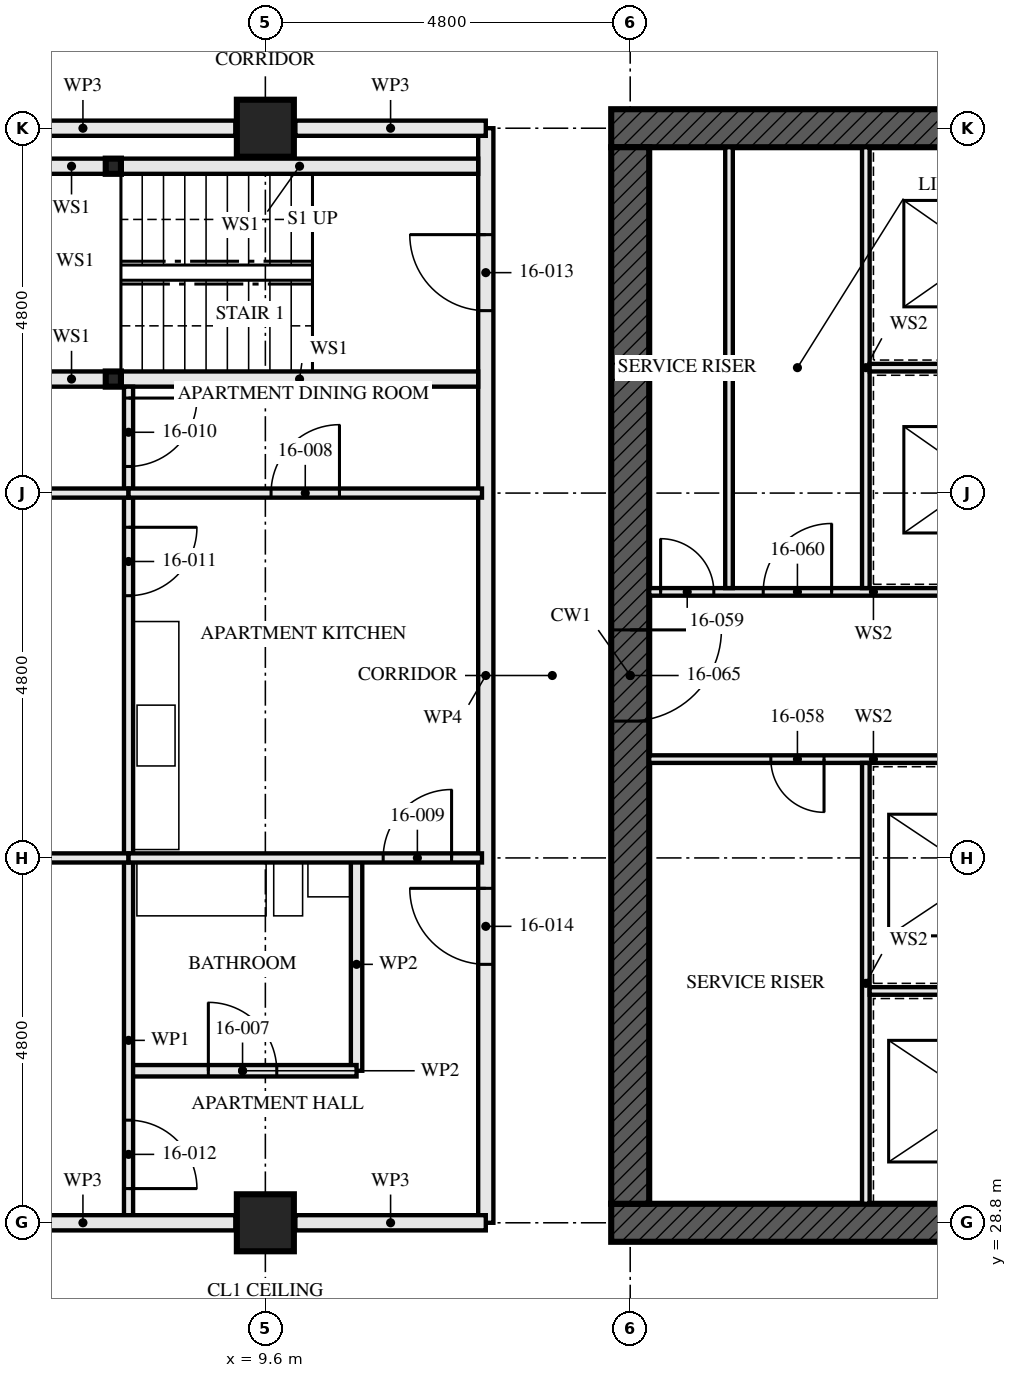
"""IFC4 building model, lengths in metres.
Left out: names, types, materials, properties, quantities, classifications, styles, units other than length and angle.
Written with IfcOpenShell. Run it as: python <this file> out.ifc"""

import sys

from ifc_helpers import new_model, si_unit, direction, frame, frame_2d, origin, origin_2d, place, context, subcontext, project, spatial, rectangle, hollow_rectangle, extrude, element, fill, save


model = new_model("IFC4")
c1 = context("Model", 3, precision=1e-05, world=origin(), true_north=direction((0.0, 1.0)))
c2 = subcontext(c1, "Body", "Model", "MODEL_VIEW")
j1 = project(units=[si_unit("LENGTHUNIT", "METRE"), si_unit("PLANEANGLEUNIT", "RADIAN")], contexts=[c1])
p1 = place(None, origin())
s1 = spatial("IfcSite", under=j1, at=p1, CompositionType="ELEMENT")
p2 = place(p1, origin())
s2 = spatial("IfcBuilding", under=s1, at=p2, CompositionType="ELEMENT")
p3 = place(p2, frame((0.0, 0.0, 62.0)))
s3 = spatial("IfcBuildingStorey", under=s2, at=p3, CompositionType="ELEMENT", Elevation=62.0)
for number, where, z_axis, x_axis in (
    (1, (9.6, 28.8, 0.0), (0.0, 0.0, 1.0), (0.0, 1.0, 0.0)),
    (2, (9.6, 43.2, 0.0), (0.0, 0.0, 1.0), (0.0, 1.0, 0.0)),
):
    element("IfcColumn", number, at=place(p3, frame(where, z_axis=z_axis, x_axis=x_axis)), inside=s3, PredefinedType="COLUMN", context=c2, shape_type="SweptSolid", body=[
        extrude(hollow_rectangle(XDim=0.75, YDim=0.75, WallThickness=0.08, at=origin_2d()), origin(), (0.0, 0.0, 1.0), 3.5),
    ])
p4 = place(p3, frame((14.15, 28.8, -0.17), z_axis=(0.0, 0.0, 1.0), x_axis=(1.0, 0.0, 0.0)))
e3 = element("IfcWall", 3, at=p4, inside=s3, PredefinedType="SHEAR", context=c2, shape_type="SweptSolid", body=[
    extrude(rectangle(XDim=14.9, YDim=0.5, at=frame_2d((7.45, 0.0))), origin(), (0.0, 0.0, 1.0), 3.5),
])
p5 = place(p4, frame((6.85, 0.0, 0.17)))
e4 = element("IfcOpeningElement", 4, at=p5, cuts=e3, PredefinedType="OPENING", context=c2, shape_type="SweptSolid", body=[
    extrude(rectangle(XDim=1.2, YDim=2.1, at=frame_2d((0.6, 1.05))), frame((0.0, 0.26, 0.0), z_axis=(0.0, -1.0, 0.0), x_axis=(1.0, 0.0, 0.0)), (0.0, 0.0, 1.0), 0.521),
])
p6 = place(p3, frame((29.05, 43.2, -0.17), z_axis=(0.0, 0.0, 1.0), x_axis=(-1.0, 0.0, 0.0)))
e5 = element("IfcWall", 5, at=p6, inside=s3, PredefinedType="SHEAR", context=c2, shape_type="SweptSolid", body=[
    extrude(rectangle(XDim=14.9, YDim=0.5, at=frame_2d((7.45, 0.0))), origin(), (0.0, 0.0, 1.0), 3.5),
])
p7 = place(p6, frame((6.85, 0.0, 0.17)))
e6 = element("IfcOpeningElement", 6, at=p7, cuts=e5, PredefinedType="OPENING", context=c2, shape_type="SweptSolid", body=[
    extrude(rectangle(XDim=1.2, YDim=2.1, at=frame_2d((0.6, 1.05))), frame((0.0, 0.26, 0.0), z_axis=(0.0, -1.0, 0.0), x_axis=(1.0, 0.0, 0.0)), (0.0, 0.0, 1.0), 0.521),
])
p8 = place(p3, frame((14.4, 42.95, -0.17), z_axis=(0.0, 0.0, 1.0), x_axis=(0.0, -1.0, 0.0)))
e7 = element("IfcWall", 7, at=p8, inside=s3, PredefinedType="SHEAR", context=c2, shape_type="SweptSolid", body=[
    extrude(rectangle(XDim=13.9, YDim=0.5, at=frame_2d((6.95, 0.0))), origin(), (0.0, 0.0, 1.0), 3.5),
])
p9 = place(p8, frame((6.35, 0.0, 0.17)))
e8 = element("IfcOpeningElement", 8, at=p9, cuts=e7, PredefinedType="OPENING", context=c2, shape_type="SweptSolid", body=[
    extrude(rectangle(XDim=1.2, YDim=2.1, at=frame_2d((0.6, 1.05))), frame((0.0, 0.26, 0.0), z_axis=(0.0, -1.0, 0.0), x_axis=(1.0, 0.0, 0.0)), (0.0, 0.0, 1.0), 0.521),
])
for number, where, z_axis, x_axis in (
    (9, (7.6, 42.7, 0.0), (0.0, 0.0, 1.0), (1.0, 0.0, 0.0)),
    (10, (7.6, 39.9, 0.0), (0.0, 0.0, 1.0), (1.0, 0.0, 0.0)),
):
    element("IfcColumn", number, at=place(p3, frame(where, z_axis=z_axis, x_axis=x_axis)), inside=s3, PredefinedType="COLUMN", context=c2, shape_type="SweptSolid", body=[
        extrude(hollow_rectangle(XDim=0.2, YDim=0.2, WallThickness=0.008, at=origin_2d()), origin(), (0.0, 0.0, 1.0), 3.33),
    ])
p10 = place(p3, frame((6.6, 42.7, 0.0), z_axis=(0.0, 0.0, 1.0), x_axis=(1.0, 0.0, 0.0)))
e11 = element("IfcWall", 11, at=p10, inside=s3, PredefinedType="SOLIDWALL", context=c2, shape_type="SweptSolid", body=[
    extrude(rectangle(XDim=0.9, YDim=0.2, at=frame_2d((0.45, 0.0))), origin(), (0.0, 0.0, 1.0), 2.99),
])
p11 = place(p3, frame((7.7, 42.7, 0.0), z_axis=(0.0, 0.0, 1.0), x_axis=(1.0, 0.0, 0.0)))
e12 = element("IfcWall", 12, at=p11, inside=s3, PredefinedType="SOLIDWALL", context=c2, shape_type="SweptSolid", body=[
    extrude(rectangle(XDim=4.7, YDim=0.2, at=frame_2d((2.35, 0.0))), origin(), (0.0, 0.0, 1.0), 2.99),
])
p12 = place(p3, frame((6.6, 39.9, 0.0), z_axis=(0.0, 0.0, 1.0), x_axis=(1.0, 0.0, 0.0)))
e13 = element("IfcWall", 13, at=p12, inside=s3, PredefinedType="SOLIDWALL", context=c2, shape_type="SweptSolid", body=[
    extrude(rectangle(XDim=0.9, YDim=0.2, at=frame_2d((0.45, 0.0))), origin(), (0.0, 0.0, 1.0), 2.99),
])
p13 = place(p3, frame((7.7, 39.9, 0.0), z_axis=(0.0, 0.0, 1.0), x_axis=(1.0, 0.0, 0.0)))
e14 = element("IfcWall", 14, at=p13, inside=s3, PredefinedType="SOLIDWALL", context=c2, shape_type="SweptSolid", body=[
    extrude(rectangle(XDim=4.7, YDim=0.2, at=frame_2d((2.35, 0.0))), origin(), (0.0, 0.0, 1.0), 2.99),
])
p14 = place(p3, frame((7.8, 30.8, 0.0), z_axis=(0.0, 0.0, 1.0), x_axis=(1.0, 0.0, 0.0)))
e15 = element("IfcWall", 15, at=p14, inside=s3, PredefinedType="PARTITIONING", context=c2, shape_type="SweptSolid", body=[
    extrude(rectangle(XDim=3.0, YDim=0.15, at=frame_2d((1.5, 0.0))), origin(), (0.0, 0.0, 1.0), 3.33),
])
p15 = place(p14, frame((1.05, 0.0, 0.0)))
e16 = element("IfcOpeningElement", 16, at=p15, cuts=e15, PredefinedType="OPENING", context=c2, shape_type="SweptSolid", body=[
    extrude(rectangle(XDim=0.9, YDim=2.1, at=frame_2d((0.45, 1.05))), frame((0.0, 0.085, 0.0), z_axis=(0.0, -1.0, 0.0), x_axis=(1.0, 0.0, 0.0)), (0.0, 0.0, 1.0), 0.171),
])
p16 = place(p3, frame((10.8, 33.6, 0.0), z_axis=(0.0, 0.0, 1.0), x_axis=(0.0, -1.0, 0.0)))
e17 = element("IfcWall", 17, at=p16, inside=s3, PredefinedType="PARTITIONING", context=c2, shape_type="SweptSolid", body=[
    extrude(rectangle(XDim=2.8, YDim=0.15, at=frame_2d((1.4, 0.0))), origin(), (0.0, 0.0, 1.0), 3.33),
])
p17 = place(p3, frame((7.8, 38.4, 0.0), z_axis=(0.0, 0.0, 1.0), x_axis=(1.0, 0.0, 0.0)))
e18 = element("IfcWall", 18, at=p17, inside=s3, PredefinedType="PARTITIONING", context=c2, shape_type="SweptSolid", body=[
    extrude(rectangle(XDim=4.65, YDim=0.12, at=frame_2d((2.325, 0.0))), origin(), (0.0, 0.0, 1.0), 2.55),
])
p18 = place(p17, frame((1.875, 0.0, 0.0)))
e19 = element("IfcOpeningElement", 19, at=p18, cuts=e18, PredefinedType="OPENING", context=c2, shape_type="SweptSolid", body=[
    extrude(rectangle(XDim=0.9, YDim=2.1, at=frame_2d((0.45, 1.05))), frame((0.0, 0.071, 0.0), z_axis=(0.0, -1.0, 0.0), x_axis=(1.0, 0.0, 0.0)), (0.0, 0.0, 1.0), 0.141),
])
p19 = place(p3, frame((7.8, 33.6, 0.0), z_axis=(0.0, 0.0, 1.0), x_axis=(1.0, 0.0, 0.0)))
e20 = element("IfcWall", 20, at=p19, inside=s3, PredefinedType="PARTITIONING", context=c2, shape_type="SweptSolid", body=[
    extrude(rectangle(XDim=4.65, YDim=0.12, at=frame_2d((2.325, 0.0))), origin(), (0.0, 0.0, 1.0), 2.55),
])
p20 = place(p19, frame((3.35, 0.0, 0.0)))
e21 = element("IfcOpeningElement", 21, at=p20, cuts=e20, PredefinedType="OPENING", context=c2, shape_type="SweptSolid", body=[
    extrude(rectangle(XDim=0.9, YDim=2.1, at=frame_2d((0.45, 1.05))), frame((0.0, 0.071, 0.0), z_axis=(0.0, -1.0, 0.0), x_axis=(1.0, 0.0, 0.0)), (0.0, 0.0, 1.0), 0.141),
])
p21 = place(p3, frame((7.8, 39.8, 0.0), z_axis=(0.0, 0.0, 1.0), x_axis=(0.0, -1.0, 0.0)))
e22 = element("IfcWall", 22, at=p21, inside=s3, PredefinedType="PARTITIONING", context=c2, shape_type="SweptSolid", body=[
    extrude(rectangle(XDim=1.4, YDim=0.12, at=frame_2d((0.7, 0.0))), origin(), (0.0, 0.0, 1.0), 3.33),
])
p22 = place(p21, frame((0.15, 0.0, 0.0)))
e23 = element("IfcOpeningElement", 23, at=p22, cuts=e22, PredefinedType="OPENING", context=c2, shape_type="SweptSolid", body=[
    extrude(rectangle(XDim=0.9, YDim=2.1, at=frame_2d((0.45, 1.05))), frame((0.0, 0.071, 0.0), z_axis=(0.0, -1.0, 0.0), x_axis=(1.0, 0.0, 0.0)), (0.0, 0.0, 1.0), 0.141),
])
p23 = place(p3, frame((7.8, 38.4, 0.0), z_axis=(0.0, 0.0, 1.0), x_axis=(0.0, -1.0, 0.0)))
e24 = element("IfcWall", 24, at=p23, inside=s3, PredefinedType="PARTITIONING", context=c2, shape_type="SweptSolid", body=[
    extrude(rectangle(XDim=4.8, YDim=0.12, at=frame_2d((2.4, 0.0))), origin(), (0.0, 0.0, 1.0), 3.33),
])
p24 = place(p23, frame((0.45, 0.0, 0.0)))
e25 = element("IfcOpeningElement", 25, at=p24, cuts=e24, PredefinedType="OPENING", context=c2, shape_type="SweptSolid", body=[
    extrude(rectangle(XDim=0.9, YDim=2.1, at=frame_2d((0.45, 1.05))), frame((0.0, 0.071, 0.0), z_axis=(0.0, -1.0, 0.0), x_axis=(1.0, 0.0, 0.0)), (0.0, 0.0, 1.0), 0.141),
])
p25 = place(p3, frame((7.8, 33.6, 0.0), z_axis=(0.0, 0.0, 1.0), x_axis=(0.0, -1.0, 0.0)))
e26 = element("IfcWall", 26, at=p25, inside=s3, PredefinedType="PARTITIONING", context=c2, shape_type="SweptSolid", body=[
    extrude(rectangle(XDim=4.8, YDim=0.12, at=frame_2d((2.4, 0.0))), origin(), (0.0, 0.0, 1.0), 3.33),
])
p26 = place(p25, frame((3.45, 0.0, 0.0)))
e27 = element("IfcOpeningElement", 27, at=p26, cuts=e26, PredefinedType="OPENING", context=c2, shape_type="SweptSolid", body=[
    extrude(rectangle(XDim=0.9, YDim=2.1, at=frame_2d((0.45, 1.05))), frame((0.0, 0.071, 0.0), z_axis=(0.0, -1.0, 0.0), x_axis=(1.0, 0.0, 0.0)), (0.0, 0.0, 1.0), 0.141),
])
for number, where, z_axis, x_axis in (
    (28, (0.395, 38.4, 0.0), (0.0, 0.0, 1.0), (1.0, 0.0, 0.0)),
    (29, (0.395, 33.6, 0.0), (0.0, 0.0, 1.0), (1.0, 0.0, 0.0)),
):
    element("IfcWall", number, at=place(p3, frame(where, z_axis=z_axis, x_axis=x_axis)), inside=s3, PredefinedType="PARTITIONING", context=c2, shape_type="SweptSolid", body=[
        extrude(rectangle(XDim=7.405, YDim=0.12, at=frame_2d((3.703, 0.0))), origin(), (0.0, 0.0, 1.0), 2.55),
    ])
p27 = place(p3, frame((12.5, 43.2, 0.0), z_axis=(0.0, 0.0, 1.0), x_axis=(0.0, -1.0, 0.0)))
e30 = element("IfcWall", 30, at=p27, inside=s3, PredefinedType="PARTITIONING", context=c2, shape_type="SweptSolid", body=[
    extrude(rectangle(XDim=14.4, YDim=0.2, at=frame_2d((7.2, 0.0))), origin(), (0.0, 0.0, 1.0), 2.55),
])
p28 = place(p27, frame((1.4, 0.0, 0.0)))
e31 = element("IfcOpeningElement", 31, at=p28, cuts=e30, PredefinedType="OPENING", context=c2, shape_type="SweptSolid", body=[
    extrude(rectangle(XDim=1.0, YDim=2.1, at=frame_2d((0.5, 1.05))), frame((0.0, 0.111, 0.0), z_axis=(0.0, -1.0, 0.0), x_axis=(1.0, 0.0, 0.0)), (0.0, 0.0, 1.0), 0.221),
])
p29 = place(p27, frame((10.0, 0.0, 0.0)))
e32 = element("IfcOpeningElement", 32, at=p29, cuts=e30, PredefinedType="OPENING", context=c2, shape_type="SweptSolid", body=[
    extrude(rectangle(XDim=1.0, YDim=2.1, at=frame_2d((0.5, 1.05))), frame((0.0, 0.111, 0.0), z_axis=(0.0, -1.0, 0.0), x_axis=(1.0, 0.0, 0.0)), (0.0, 0.0, 1.0), 0.221),
])
p30 = place(p3, frame((15.7, 37.15, 0.0), z_axis=(0.0, 0.0, 1.0), x_axis=(0.0, 1.0, 0.0)))
e33 = element("IfcWall", 33, at=p30, inside=s3, PredefinedType="SOLIDWALL", context=c2, shape_type="SweptSolid", body=[
    extrude(rectangle(XDim=5.8, YDim=0.1, at=frame_2d((2.9, 0.0))), origin(), (0.0, 0.0, 1.0), 3.33),
])
p31 = place(p3, frame((14.65, 34.9, 0.0), z_axis=(0.0, 0.0, 1.0), x_axis=(1.0, 0.0, 0.0)))
e34 = element("IfcWall", 34, at=p31, inside=s3, PredefinedType="SOLIDWALL", context=c2, shape_type="SweptSolid", body=[
    extrude(rectangle(XDim=5.9, YDim=0.1, at=frame_2d((2.95, 0.0))), origin(), (0.0, 0.0, 1.0), 3.33),
])
p32 = place(p31, frame((1.6, 0.0, 0.0)))
e35 = element("IfcOpeningElement", 35, at=p32, cuts=e34, PredefinedType="OPENING", context=c2, shape_type="SweptSolid", body=[
    extrude(rectangle(XDim=0.7, YDim=2.1, at=frame_2d((0.35, 1.05))), frame((0.0, 0.061, 0.0), z_axis=(0.0, -1.0, 0.0), x_axis=(1.0, 0.0, 0.0)), (0.0, 0.0, 1.0), 0.121),
])
p33 = place(p3, frame((14.65, 37.1, 0.0), z_axis=(0.0, 0.0, 1.0), x_axis=(1.0, 0.0, 0.0)))
e36 = element("IfcWall", 36, at=p33, inside=s3, PredefinedType="SOLIDWALL", context=c2, shape_type="SweptSolid", body=[
    extrude(rectangle(XDim=5.9, YDim=0.1, at=frame_2d((2.95, 0.0))), origin(), (0.0, 0.0, 1.0), 3.33),
])
p34 = place(p33, frame((0.15, 0.0, 0.0)))
e37 = element("IfcOpeningElement", 37, at=p34, cuts=e36, PredefinedType="OPENING", context=c2, shape_type="SweptSolid", body=[
    extrude(rectangle(XDim=0.7, YDim=2.1, at=frame_2d((0.35, 1.05))), frame((0.0, 0.061, 0.0), z_axis=(0.0, -1.0, 0.0), x_axis=(1.0, 0.0, 0.0)), (0.0, 0.0, 1.0), 0.121),
])
p35 = place(p33, frame((1.5, 0.0, 0.0)))
e38 = element("IfcOpeningElement", 38, at=p35, cuts=e36, PredefinedType="OPENING", context=c2, shape_type="SweptSolid", body=[
    extrude(rectangle(XDim=0.9, YDim=2.1, at=frame_2d((0.45, 1.05))), frame((0.0, 0.061, 0.0), z_axis=(0.0, -1.0, 0.0), x_axis=(1.0, 0.0, 0.0)), (0.0, 0.0, 1.0), 0.121),
])
p36 = place(p3, frame((17.5, 29.05, 0.0), z_axis=(0.0, 0.0, 1.0), x_axis=(0.0, 1.0, 0.0)))
e39 = element("IfcWall", 39, at=p36, inside=s3, PredefinedType="SOLIDWALL", context=c2, shape_type="SweptSolid", body=[
    extrude(rectangle(XDim=5.8, YDim=0.1, at=frame_2d((2.9, 0.0))), origin(), (0.0, 0.0, 1.0), 3.33),
])
p37 = place(p3, frame((17.55, 31.85, 0.0), z_axis=(0.0, 0.0, 1.0), x_axis=(1.0, 0.0, 0.0)))
e40 = element("IfcWall", 40, at=p37, inside=s3, PredefinedType="SOLIDWALL", context=c2, shape_type="SweptSolid", body=[
    extrude(rectangle(XDim=2.9, YDim=0.1, at=frame_2d((1.45, 0.0))), origin(), (0.0, 0.0, 1.0), 3.33),
])
p38 = place(p3, frame((17.5, 37.15, 0.0), z_axis=(0.0, 0.0, 1.0), x_axis=(0.0, 1.0, 0.0)))
e41 = element("IfcWall", 41, at=p38, inside=s3, PredefinedType="SOLIDWALL", context=c2, shape_type="SweptSolid", body=[
    extrude(rectangle(XDim=5.8, YDim=0.1, at=frame_2d((2.9, 0.0))), origin(), (0.0, 0.0, 1.0), 3.33),
])
p39 = place(p3, frame((17.55, 40.05, 0.0), z_axis=(0.0, 0.0, 1.0), x_axis=(1.0, 0.0, 0.0)))
e42 = element("IfcWall", 42, at=p39, inside=s3, PredefinedType="SOLIDWALL", context=c2, shape_type="SweptSolid", body=[
    extrude(rectangle(XDim=2.9, YDim=0.1, at=frame_2d((1.45, 0.0))), origin(), (0.0, 0.0, 1.0), 3.33),
])
p40 = place(p3, frame((12.5, 28.8, 0.0), z_axis=(0.0, 0.0, 1.0), x_axis=(-1.0, 0.0, 0.0)))
e43 = element("IfcWall", 43, at=p40, inside=s3, PredefinedType="PARTITIONING", context=c2, shape_type="SweptSolid", body=[
    extrude(rectangle(XDim=2.505, YDim=0.2, at=frame_2d((1.252, 0.0))), origin(), (0.0, 0.0, 1.0), 2.32),
])
p41 = place(p3, frame((9.205, 28.8, 0.0), z_axis=(0.0, 0.0, 1.0), x_axis=(-1.0, 0.0, 0.0)))
e44 = element("IfcWall", 44, at=p41, inside=s3, PredefinedType="PARTITIONING", context=c2, shape_type="SweptSolid", body=[
    extrude(rectangle(XDim=4.01, YDim=0.2, at=frame_2d((2.005, 0.0))), origin(), (0.0, 0.0, 1.0), 2.32),
])
p42 = place(p3, frame((12.5, 43.2, 0.0), z_axis=(0.0, 0.0, 1.0), x_axis=(-1.0, 0.0, 0.0)))
e45 = element("IfcWall", 45, at=p42, inside=s3, PredefinedType="PARTITIONING", context=c2, shape_type="SweptSolid", body=[
    extrude(rectangle(XDim=2.505, YDim=0.2, at=frame_2d((1.252, 0.0))), origin(), (0.0, 0.0, 1.0), 2.32),
])
p43 = place(p3, frame((9.205, 43.2, 0.0), z_axis=(0.0, 0.0, 1.0), x_axis=(-1.0, 0.0, 0.0)))
e46 = element("IfcWall", 46, at=p43, inside=s3, PredefinedType="PARTITIONING", context=c2, shape_type="SweptSolid", body=[
    extrude(rectangle(XDim=4.01, YDim=0.2, at=frame_2d((2.005, 0.0))), origin(), (0.0, 0.0, 1.0), 2.32),
])
p44 = place(p15, origin())
e47 = element("IfcDoor", 47, at=p44, inside=s3, OperationType="SINGLE_SWING_RIGHT", PredefinedType="DOOR", context=c2, shape_type="SweptSolid", body=[
    extrude(rectangle(XDim=0.9, YDim=2.1, at=frame_2d((0.45, 1.05))), frame((0.0, 0.022, 0.0), z_axis=(0.0, -1.0, 0.0), x_axis=(1.0, 0.0, 0.0)), (0.0, 0.0, 1.0), 0.044),
])
fill(e16, e47)
p45 = place(p18, origin())
e48 = element("IfcDoor", 48, at=p45, inside=s3, OperationType="SINGLE_SWING_LEFT", PredefinedType="DOOR", context=c2, shape_type="SweptSolid", body=[
    extrude(rectangle(XDim=0.9, YDim=2.1, at=frame_2d((0.45, 1.05))), frame((0.0, 0.022, 0.0), z_axis=(0.0, -1.0, 0.0), x_axis=(1.0, 0.0, 0.0)), (0.0, 0.0, 1.0), 0.044),
])
fill(e19, e48)
p46 = place(p20, origin())
e49 = element("IfcDoor", 49, at=p46, inside=s3, OperationType="SINGLE_SWING_LEFT", PredefinedType="DOOR", context=c2, shape_type="SweptSolid", body=[
    extrude(rectangle(XDim=0.9, YDim=2.1, at=frame_2d((0.45, 1.05))), frame((0.0, 0.022, 0.0), z_axis=(0.0, -1.0, 0.0), x_axis=(1.0, 0.0, 0.0)), (0.0, 0.0, 1.0), 0.044),
])
fill(e21, e49)
p47 = place(p22, origin())
e50 = element("IfcDoor", 50, at=p47, inside=s3, OperationType="SINGLE_SWING_RIGHT", PredefinedType="DOOR", context=c2, shape_type="SweptSolid", body=[
    extrude(rectangle(XDim=0.9, YDim=2.1, at=frame_2d((0.45, 1.05))), frame((0.0, 0.022, 0.0), z_axis=(0.0, -1.0, 0.0), x_axis=(1.0, 0.0, 0.0)), (0.0, 0.0, 1.0), 0.044),
])
fill(e23, e50)
p48 = place(p24, origin())
e51 = element("IfcDoor", 51, at=p48, inside=s3, OperationType="SINGLE_SWING_RIGHT", PredefinedType="DOOR", context=c2, shape_type="SweptSolid", body=[
    extrude(rectangle(XDim=0.9, YDim=2.1, at=frame_2d((0.45, 1.05))), frame((0.0, 0.022, 0.0), z_axis=(0.0, -1.0, 0.0), x_axis=(1.0, 0.0, 0.0)), (0.0, 0.0, 1.0), 0.044),
])
fill(e25, e51)
p49 = place(p26, origin())
e52 = element("IfcDoor", 52, at=p49, inside=s3, OperationType="SINGLE_SWING_LEFT", PredefinedType="DOOR", context=c2, shape_type="SweptSolid", body=[
    extrude(rectangle(XDim=0.9, YDim=2.1, at=frame_2d((0.45, 1.05))), frame((0.0, 0.022, 0.0), z_axis=(0.0, -1.0, 0.0), x_axis=(1.0, 0.0, 0.0)), (0.0, 0.0, 1.0), 0.044),
])
fill(e27, e52)
p50 = place(p28, frame((1.0, 0.0, 0.0), z_axis=(0.0, 0.0, 1.0), x_axis=(-1.0, 0.0, 0.0)))
e53 = element("IfcDoor", 53, at=p50, inside=s3, OperationType="SINGLE_SWING_LEFT", PredefinedType="DOOR", context=c2, shape_type="SweptSolid", body=[
    extrude(rectangle(XDim=1.0, YDim=2.1, at=frame_2d((0.5, 1.05))), frame((0.0, 0.032, 0.0), z_axis=(0.0, -1.0, 0.0), x_axis=(1.0, 0.0, 0.0)), (0.0, 0.0, 1.0), 0.064),
])
fill(e31, e53)
p51 = place(p29, frame((1.0, 0.0, 0.0), z_axis=(0.0, 0.0, 1.0), x_axis=(-1.0, 0.0, 0.0)))
e54 = element("IfcDoor", 54, at=p51, inside=s3, OperationType="SINGLE_SWING_LEFT", PredefinedType="DOOR", context=c2, shape_type="SweptSolid", body=[
    extrude(rectangle(XDim=1.0, YDim=2.1, at=frame_2d((0.5, 1.05))), frame((0.0, 0.027, 0.0), z_axis=(0.0, -1.0, 0.0), x_axis=(1.0, 0.0, 0.0)), (0.0, 0.0, 1.0), 0.054),
])
fill(e32, e54)
p52 = place(p32, frame((0.7, 0.0, 0.0), z_axis=(0.0, 0.0, 1.0), x_axis=(-1.0, 0.0, 0.0)))
e55 = element("IfcDoor", 55, at=p52, inside=s3, OperationType="SINGLE_SWING_RIGHT", PredefinedType="DOOR", context=c2, shape_type="SweptSolid", body=[
    extrude(rectangle(XDim=0.7, YDim=2.1, at=frame_2d((0.35, 1.05))), frame((0.0, 0.027, 0.0), z_axis=(0.0, -1.0, 0.0), x_axis=(1.0, 0.0, 0.0)), (0.0, 0.0, 1.0), 0.054),
])
fill(e35, e55)
p53 = place(p34, origin())
e56 = element("IfcDoor", 56, at=p53, inside=s3, OperationType="SINGLE_SWING_RIGHT", PredefinedType="DOOR", context=c2, shape_type="SweptSolid", body=[
    extrude(rectangle(XDim=0.7, YDim=2.1, at=frame_2d((0.35, 1.05))), frame((0.0, 0.027, 0.0), z_axis=(0.0, -1.0, 0.0), x_axis=(1.0, 0.0, 0.0)), (0.0, 0.0, 1.0), 0.054),
])
fill(e37, e56)
p54 = place(p35, origin())
e57 = element("IfcDoor", 57, at=p54, inside=s3, OperationType="SINGLE_SWING_LEFT", PredefinedType="DOOR", context=c2, shape_type="SweptSolid", body=[
    extrude(rectangle(XDim=0.9, YDim=2.1, at=frame_2d((0.45, 1.05))), frame((0.0, 0.027, 0.0), z_axis=(0.0, -1.0, 0.0), x_axis=(1.0, 0.0, 0.0)), (0.0, 0.0, 1.0), 0.054),
])
fill(e38, e57)
p55 = place(p9, origin())
e58 = element("IfcDoor", 58, at=p55, inside=s3, OperationType="SINGLE_SWING_LEFT", PredefinedType="DOOR", context=c2, shape_type="SweptSolid", body=[
    extrude(rectangle(XDim=1.2, YDim=2.1, at=frame_2d((0.6, 1.05))), frame((0.0, 0.027, 0.0), z_axis=(0.0, -1.0, 0.0), x_axis=(1.0, 0.0, 0.0)), (0.0, 0.0, 1.0), 0.054),
])
fill(e8, e58)
save(model, sys.argv[1])
